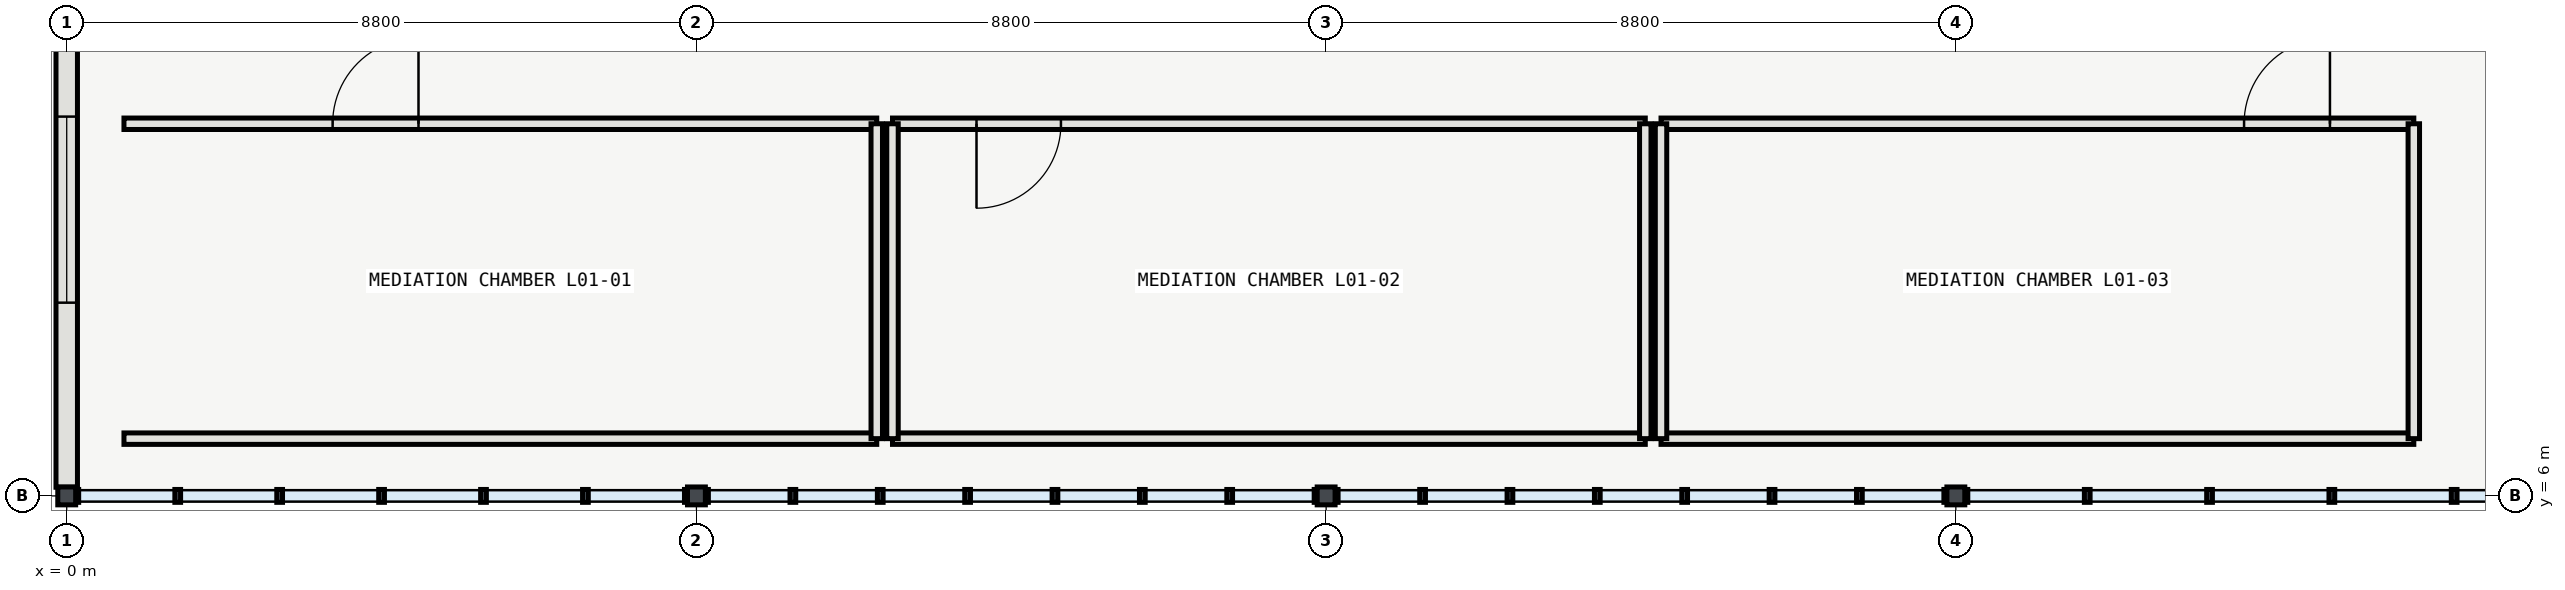
"""IFC4 building model, lengths in metres.
Left out: names, types, materials, properties, quantities, classifications, styles, units other than length and angle.
Written with IfcOpenShell. Run it as: python <this file> out.ifc"""

import sys

from ifc_helpers import new_model, si_unit, direction, frame, frame_2d, origin, origin_2d, place, context, subcontext, project, spatial, rectangle, i_section, extrude, element, fill, save


model = new_model("IFC4")
c1 = context("Model", 3, precision=1e-05, world=origin(), true_north=direction((0.0, 1.0)))
c2 = subcontext(c1, "Body", "Model", "MODEL_VIEW")
j1 = project(units=[si_unit("LENGTHUNIT", "METRE"), si_unit("PLANEANGLEUNIT", "RADIAN")], contexts=[c1])
p1 = place(None, origin())
s1 = spatial("IfcSite", under=j1, at=p1, CompositionType="ELEMENT")
p2 = place(p1, origin())
s2 = spatial("IfcBuilding", under=s1, at=p2, CompositionType="ELEMENT")
p3 = place(p2, frame((0.0, 0.0, 5.4)))
s3 = spatial("IfcBuildingStorey", under=s2, at=p3, CompositionType="ELEMENT", Elevation=5.4)
for number, where, z_axis, x_axis in (
    (1, (0.0, 6.0, 0.0), (0.0, 0.0, 1.0), (1.0, 0.0, 0.0)),
    (2, (8.8, 6.0, 0.0), (0.0, 0.0, 1.0), (1.0, 0.0, 0.0)),
    (3, (17.6, 6.0, 0.0), (0.0, 0.0, 1.0), (1.0, 0.0, 0.0)),
    (4, (26.4, 6.0, 0.0), (0.0, 0.0, 1.0), (1.0, 0.0, 0.0)),
):
    element("IfcColumn", number, at=place(p3, frame(where, z_axis=z_axis, x_axis=x_axis)), inside=s3, PredefinedType="COLUMN", context=c2, shape_type="SweptSolid", body=[
        extrude(i_section(OverallWidth=0.25, OverallDepth=0.25, WebThickness=0.009, FlangeThickness=0.014, FilletRadius=0.016, at=origin_2d()), origin(), (0.0, 0.0, 1.0), 5.4),
    ])
p4 = place(p3, frame((0.0, 13.879, 0.0), z_axis=(0.0, 0.0, 1.0), x_axis=(0.0, -1.0, 0.0)))
e5 = element("IfcWall", 5, at=p4, inside=s3, PredefinedType="SOLIDWALL", context=c2, shape_type="SweptSolid", body=[
    extrude(rectangle(XDim=7.758, YDim=0.3, at=frame_2d((3.879, 0.0))), origin(), (0.0, 0.0, 1.0), 4.523),
])
p5 = place(p4, frame((2.579, 0.0, 0.95)))
e6 = element("IfcOpeningElement", 6, at=p5, cuts=e5, PredefinedType="OPENING", context=c2, shape_type="SweptSolid", body=[
    extrude(rectangle(XDim=2.6, YDim=2.1, at=frame_2d((1.3, 1.05))), frame((0.0, 0.16, 0.0), z_axis=(0.0, -1.0, 0.0), x_axis=(1.0, 0.0, 0.0)), (0.0, 0.0, 1.0), 0.32),
])
p6 = place(p3, frame((0.8, 6.8, 0.0), z_axis=(0.0, 0.0, 1.0), x_axis=(1.0, 0.0, 0.0)))
e7 = element("IfcWall", 7, at=p6, inside=s3, PredefinedType="PARTITIONING", context=c2, shape_type="SweptSolid", body=[
    extrude(rectangle(XDim=10.52, YDim=0.16, at=frame_2d((5.26, 0.0))), origin(), (0.0, 0.0, 1.0), 5.12),
])
p7 = place(p3, frame((11.32, 11.2, 0.0), z_axis=(0.0, 0.0, 1.0), x_axis=(-1.0, 0.0, 0.0)))
e8 = element("IfcWall", 8, at=p7, inside=s3, PredefinedType="PARTITIONING", context=c2, shape_type="SweptSolid", body=[
    extrude(rectangle(XDim=10.52, YDim=0.16, at=frame_2d((5.26, 0.0))), origin(), (0.0, 0.0, 1.0), 5.12),
])
p8 = place(p7, frame((6.404, 0.0, 0.0)))
e9 = element("IfcOpeningElement", 9, at=p8, cuts=e8, PredefinedType="OPENING", context=c2, shape_type="SweptSolid", body=[
    extrude(rectangle(XDim=1.2, YDim=2.2, at=frame_2d((0.6, 1.1))), frame((0.0, 0.09, 0.0), z_axis=(0.0, -1.0, 0.0), x_axis=(1.0, 0.0, 0.0)), (0.0, 0.0, 1.0), 0.18),
])
p9 = place(p3, frame((11.32, 6.8, 0.0), z_axis=(0.0, 0.0, 1.0), x_axis=(0.0, 1.0, 0.0)))
e10 = element("IfcWall", 10, at=p9, inside=s3, PredefinedType="PARTITIONING", context=c2, shape_type="SweptSolid", body=[
    extrude(rectangle(XDim=4.4, YDim=0.16, at=frame_2d((2.2, 0.0))), origin(), (0.0, 0.0, 1.0), 5.12),
])
p10 = place(p3, frame((11.54, 6.8, 0.0), z_axis=(0.0, 0.0, 1.0), x_axis=(1.0, 0.0, 0.0)))
e11 = element("IfcWall", 11, at=p10, inside=s3, PredefinedType="PARTITIONING", context=c2, shape_type="SweptSolid", body=[
    extrude(rectangle(XDim=10.52, YDim=0.16, at=frame_2d((5.26, 0.0))), origin(), (0.0, 0.0, 1.0), 5.12),
])
p11 = place(p3, frame((22.06, 11.2, 0.0), z_axis=(0.0, 0.0, 1.0), x_axis=(-1.0, 0.0, 0.0)))
e12 = element("IfcWall", 12, at=p11, inside=s3, PredefinedType="PARTITIONING", context=c2, shape_type="SweptSolid", body=[
    extrude(rectangle(XDim=10.52, YDim=0.16, at=frame_2d((5.26, 0.0))), origin(), (0.0, 0.0, 1.0), 5.12),
])
p12 = place(p11, frame((8.166, 0.0, 0.0)))
e13 = element("IfcOpeningElement", 13, at=p12, cuts=e12, PredefinedType="OPENING", context=c2, shape_type="SweptSolid", body=[
    extrude(rectangle(XDim=1.18, YDim=2.2, at=frame_2d((0.59, 1.1))), frame((0.0, 0.09, 0.0), z_axis=(0.0, -1.0, 0.0), x_axis=(1.0, 0.0, 0.0)), (0.0, 0.0, 1.0), 0.18),
])
p13 = place(p3, frame((11.54, 11.2, 0.0), z_axis=(0.0, 0.0, 1.0), x_axis=(0.0, -1.0, 0.0)))
e14 = element("IfcWall", 14, at=p13, inside=s3, PredefinedType="PARTITIONING", context=c2, shape_type="SweptSolid", body=[
    extrude(rectangle(XDim=4.4, YDim=0.16, at=frame_2d((2.2, 0.0))), origin(), (0.0, 0.0, 1.0), 5.12),
])
p14 = place(p3, frame((22.06, 6.8, 0.0), z_axis=(0.0, 0.0, 1.0), x_axis=(0.0, 1.0, 0.0)))
e15 = element("IfcWall", 15, at=p14, inside=s3, PredefinedType="PARTITIONING", context=c2, shape_type="SweptSolid", body=[
    extrude(rectangle(XDim=4.4, YDim=0.16, at=frame_2d((2.2, 0.0))), origin(), (0.0, 0.0, 1.0), 4.882),
])
p15 = place(p3, frame((22.28, 6.8, 0.0), z_axis=(0.0, 0.0, 1.0), x_axis=(1.0, 0.0, 0.0)))
e16 = element("IfcWall", 16, at=p15, inside=s3, PredefinedType="PARTITIONING", context=c2, shape_type="SweptSolid", body=[
    extrude(rectangle(XDim=10.52, YDim=0.16, at=frame_2d((5.26, 0.0))), origin(), (0.0, 0.0, 1.0), 5.12),
])
p16 = place(p3, frame((32.8, 11.2, 0.0), z_axis=(0.0, 0.0, 1.0), x_axis=(-1.0, 0.0, 0.0)))
e17 = element("IfcWall", 17, at=p16, inside=s3, PredefinedType="PARTITIONING", context=c2, shape_type="SweptSolid", body=[
    extrude(rectangle(XDim=10.52, YDim=0.16, at=frame_2d((5.26, 0.0))), origin(), (0.0, 0.0, 1.0), 5.12),
])
p17 = place(p16, frame((1.172, 0.0, 0.0)))
e18 = element("IfcOpeningElement", 18, at=p17, cuts=e17, PredefinedType="OPENING", context=c2, shape_type="SweptSolid", body=[
    extrude(rectangle(XDim=1.2, YDim=2.2, at=frame_2d((0.6, 1.1))), frame((0.0, 0.09, 0.0), z_axis=(0.0, -1.0, 0.0), x_axis=(1.0, 0.0, 0.0)), (0.0, 0.0, 1.0), 0.18),
])
p18 = place(p3, frame((22.28, 11.2, 0.0), z_axis=(0.0, 0.0, 1.0), x_axis=(0.0, -1.0, 0.0)))
e19 = element("IfcWall", 19, at=p18, inside=s3, PredefinedType="PARTITIONING", context=c2, shape_type="SweptSolid", body=[
    extrude(rectangle(XDim=4.4, YDim=0.16, at=frame_2d((2.2, 0.0))), origin(), (0.0, 0.0, 1.0), 4.882),
])
p19 = place(p3, frame((32.8, 6.8, 0.0), z_axis=(0.0, 0.0, 1.0), x_axis=(0.0, 1.0, 0.0)))
e20 = element("IfcWall", 20, at=p19, inside=s3, PredefinedType="PARTITIONING", context=c2, shape_type="SweptSolid", body=[
    extrude(rectangle(XDim=4.4, YDim=0.16, at=frame_2d((2.2, 0.0))), origin(), (0.0, 0.0, 1.0), 5.12),
])
p20 = place(p5, origin())
e21 = element("IfcWindow", 21, at=p20, inside=s3, PartitioningType="SINGLE_PANEL", PredefinedType="WINDOW", context=c2, shape_type="SweptSolid", body=[
    extrude(rectangle(XDim=2.6, YDim=2.1, at=frame_2d((1.3, 1.05))), frame((0.0, 0.03, 0.0), z_axis=(0.0, -1.0, 0.0), x_axis=(1.0, 0.0, 0.0)), (0.0, 0.0, 1.0), 0.06),
])
fill(e6, e21)
p21 = place(p8, origin())
e22 = element("IfcDoor", 22, at=p21, inside=s3, OperationType="SINGLE_SWING_LEFT", PredefinedType="DOOR", context=c2, shape_type="SweptSolid", body=[
    extrude(rectangle(XDim=1.2, YDim=2.2, at=frame_2d((0.6, 1.1))), frame((0.0, 0.025, 0.0), z_axis=(0.0, -1.0, 0.0), x_axis=(1.0, 0.0, 0.0)), (0.0, 0.0, 1.0), 0.05),
])
fill(e9, e22)
p22 = place(p12, origin())
e23 = element("IfcDoor", 23, at=p22, inside=s3, OperationType="SINGLE_SWING_RIGHT", PredefinedType="DOOR", context=c2, shape_type="SweptSolid", body=[
    extrude(rectangle(XDim=1.18, YDim=2.2, at=frame_2d((0.59, 1.1))), frame((0.0, 0.025, 0.0), z_axis=(0.0, -1.0, 0.0), x_axis=(1.0, 0.0, 0.0)), (0.0, 0.0, 1.0), 0.05),
])
fill(e13, e23)
p23 = place(p17, origin())
e24 = element("IfcDoor", 24, at=p23, inside=s3, OperationType="SINGLE_SWING_LEFT", PredefinedType="DOOR", context=c2, shape_type="SweptSolid", body=[
    extrude(rectangle(XDim=1.2, YDim=2.2, at=frame_2d((0.6, 1.1))), frame((0.0, 0.025, 0.0), z_axis=(0.0, -1.0, 0.0), x_axis=(1.0, 0.0, 0.0)), (0.0, 0.0, 1.0), 0.05),
])
fill(e18, e24)
save(model, sys.argv[1])
